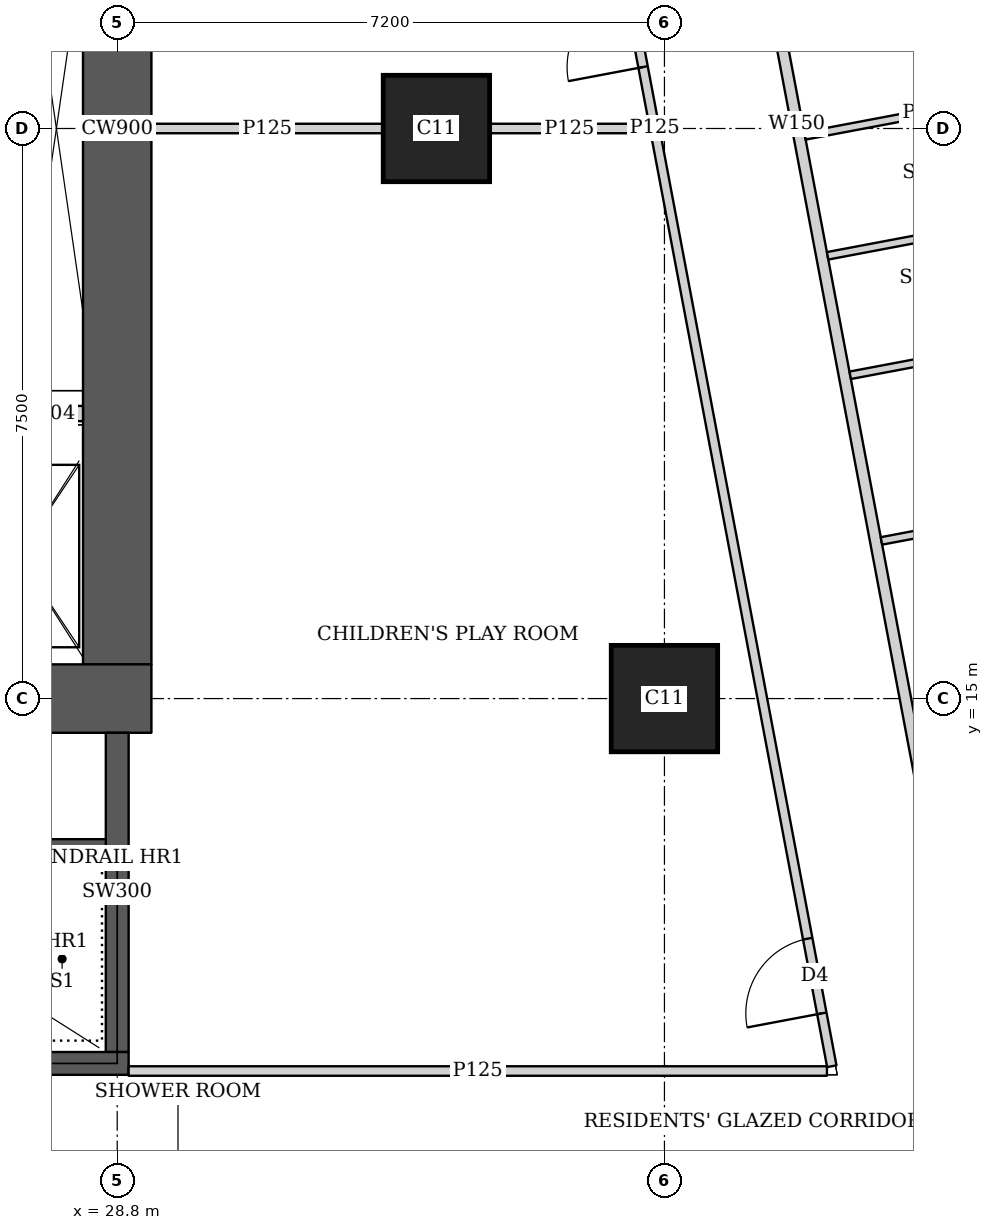
"""IFC4 building model, lengths in metres.
Left out: names, types, materials, properties, quantities, classifications, styles, units other than length and angle.
Written with IfcOpenShell. Run it as: python <this file> out.ifc"""

import sys

from ifc_helpers import new_model, si_unit, direction, frame, frame_2d, origin, origin_2d, place, context, subcontext, project, spatial, rectangle, extrude, element, fill, save


model = new_model("IFC4")
c1 = context("Model", 3, precision=1e-05, world=origin(), true_north=direction((0.0, 1.0)))
c2 = subcontext(c1, "Body", "Model", "MODEL_VIEW")
j1 = project(units=[si_unit("LENGTHUNIT", "METRE"), si_unit("PLANEANGLEUNIT", "RADIAN")], contexts=[c1])
p1 = place(None, origin())
s1 = spatial("IfcSite", under=j1, at=p1, CompositionType="ELEMENT")
p2 = place(p1, origin())
s2 = spatial("IfcBuilding", under=s1, at=p2, CompositionType="ELEMENT")
p3 = place(p2, frame((0.0, 0.0, 234.95)))
s3 = spatial("IfcBuildingStorey", under=s2, at=p3, CompositionType="ELEMENT", Elevation=234.95)
for number, where, z_axis, x_axis in (
    (1, (36.0, 15.0, 0.0), (0.0, 0.0, 1.0), (1.0, 0.0, 0.0)),
    (2, (33.0, 22.5, 0.0), (0.0, 0.0, 1.0), (1.0, 0.0, 0.0)),
):
    element("IfcColumn", number, at=place(p3, frame(where, z_axis=z_axis, x_axis=x_axis)), inside=s3, PredefinedType="COLUMN", context=c2, shape_type="SweptSolid", body=[
        extrude(rectangle(XDim=1.4, YDim=1.4, at=origin_2d()), origin(), (0.0, 0.0, 1.0), 3.75),
    ])
p4 = place(p3, frame((13.95, 15.0, 0.0), z_axis=(0.0, 0.0, 1.0), x_axis=(1.0, 0.0, 0.0)))
e3 = element("IfcWall", 3, at=p4, inside=s3, PredefinedType="SHEAR", context=c2, shape_type="SweptSolid", body=[
    extrude(rectangle(XDim=15.3, YDim=0.9, at=frame_2d((7.65, 0.0))), origin(), (0.0, 0.0, 1.0), 3.75),
])
p5 = place(p4, frame((4.45, 0.0, 0.0)))
e4 = element("IfcOpeningElement", 4, at=p5, cuts=e3, PredefinedType="OPENING", context=c2, shape_type="SweptSolid", body=[
    extrude(rectangle(XDim=1.8, YDim=2.1, at=frame_2d((0.9, 1.05))), frame((0.0, 0.46, 0.0), z_axis=(0.0, -1.0, 0.0), x_axis=(1.0, 0.0, 0.0)), (0.0, 0.0, 1.0), 0.92),
])
p6 = place(p4, frame((10.7, 0.0, 0.0)))
e5 = element("IfcOpeningElement", 5, at=p6, cuts=e3, PredefinedType="OPENING", context=c2, shape_type="SweptSolid", body=[
    extrude(rectangle(XDim=1.1, YDim=2.1, at=frame_2d((0.55, 1.05))), frame((0.0, 0.46, 0.0), z_axis=(0.0, -1.0, 0.0), x_axis=(1.0, 0.0, 0.0)), (0.0, 0.0, 1.0), 0.92),
])
p7 = place(p3, frame((28.8, 15.45, 0.0), z_axis=(0.0, 0.0, 1.0), x_axis=(0.0, 1.0, 0.0)))
e6 = element("IfcWall", 6, at=p7, inside=s3, PredefinedType="SHEAR", context=c2, shape_type="SweptSolid", body=[
    extrude(rectangle(XDim=14.1, YDim=0.9, at=frame_2d((7.05, 0.0))), origin(), (0.0, 0.0, 1.0), 3.75),
])
p8 = place(p3, frame((21.45, 10.2, 0.0), z_axis=(0.0, 0.0, 1.0), x_axis=(1.0, 0.0, 0.0)))
e7 = element("IfcWall", 7, at=p8, inside=s3, PredefinedType="SHEAR", context=c2, shape_type="SweptSolid", body=[
    extrude(rectangle(XDim=7.5, YDim=0.3, at=frame_2d((3.75, 0.0))), origin(), (0.0, 0.0, 1.0), 3.75),
])
p9 = place(p8, frame((0.5, 0.0, 0.0)))
e8 = element("IfcOpeningElement", 8, at=p9, cuts=e7, PredefinedType="OPENING", context=c2, shape_type="SweptSolid", body=[
    extrude(rectangle(XDim=1.1, YDim=2.1, at=frame_2d((0.55, 1.05))), frame((0.0, 0.16, 0.0), z_axis=(0.0, -1.0, 0.0), x_axis=(1.0, 0.0, 0.0)), (0.0, 0.0, 1.0), 0.32),
])
p10 = place(p3, frame((28.8, 10.35, 0.0), z_axis=(0.0, 0.0, 1.0), x_axis=(0.0, 1.0, 0.0)))
e9 = element("IfcWall", 9, at=p10, inside=s3, PredefinedType="SHEAR", context=c2, shape_type="SweptSolid", body=[
    extrude(rectangle(XDim=4.2, YDim=0.3, at=frame_2d((2.1, 0.0))), origin(), (0.0, 0.0, 1.0), 3.75),
])
p11 = place(p3, frame((33.933, 42.73, 0.0), z_axis=(0.0, 0.0, 1.0), x_axis=(0.185595417643, -0.982626246825, 0.0)))
e10 = element("IfcWall", 10, at=p11, inside=s3, PredefinedType="SOLIDWALL", context=c2, shape_type="SweptSolid", body=[
    extrude(rectangle(XDim=41.051, YDim=0.15, at=frame_2d((20.525, 0.0))), origin(), (0.0, 0.0, 1.0), 2.5),
])
p12 = place(p11, frame((12.266, 0.0, 0.0)))
e11 = element("IfcOpeningElement", 11, at=p12, cuts=e10, PredefinedType="OPENING", context=c2, shape_type="SweptSolid", body=[
    extrude(rectangle(XDim=1.0, YDim=2.1, at=frame_2d((0.5, 1.05))), frame((0.0, 0.085, 0.0), z_axis=(0.0, -1.0, 0.0), x_axis=(1.0, 0.0, 0.0)), (0.0, 0.0, 1.0), 0.17),
])
p13 = place(p11, frame((16.082, 0.0, 0.0)))
e12 = element("IfcOpeningElement", 12, at=p13, cuts=e10, PredefinedType="OPENING", context=c2, shape_type="SweptSolid", body=[
    extrude(rectangle(XDim=1.0, YDim=2.1, at=frame_2d((0.5, 1.05))), frame((0.0, 0.085, 0.0), z_axis=(0.0, -1.0, 0.0), x_axis=(1.0, 0.0, 0.0)), (0.0, 0.0, 1.0), 0.17),
])
p14 = place(p11, frame((30.862, 0.0, 0.0)))
e13 = element("IfcOpeningElement", 13, at=p14, cuts=e10, PredefinedType="OPENING", context=c2, shape_type="SweptSolid", body=[
    extrude(rectangle(XDim=1.0, YDim=2.1, at=frame_2d((0.5, 1.05))), frame((0.0, 0.085, 0.0), z_axis=(0.0, -1.0, 0.0), x_axis=(1.0, 0.0, 0.0)), (0.0, 0.0, 1.0), 0.17),
])
p15 = place(p3, frame((41.365, 21.433, 0.0), z_axis=(0.0, 0.0, 1.0), x_axis=(-0.982607026909, -0.185697147715, 0.0)))
e14 = element("IfcWall", 14, at=p15, inside=s3, PredefinedType="PARTITIONING", context=c2, shape_type="SweptSolid", body=[
    extrude(rectangle(XDim=3.275, YDim=0.1, at=frame_2d((1.637, 0.0))), origin(), (0.0, 0.0, 1.0), 3.5),
])
p16 = place(p3, frame((42.073, 17.682, 0.0), z_axis=(0.0, 0.0, 1.0), x_axis=(-0.982620626894, -0.185625169636, 0.0)))
e15 = element("IfcWall", 15, at=p16, inside=s3, PredefinedType="PARTITIONING", context=c2, shape_type="SweptSolid", body=[
    extrude(rectangle(XDim=3.275, YDim=0.1, at=frame_2d((1.637, 0.0))), origin(), (0.0, 0.0, 1.0), 3.5),
])
p17 = place(p16, frame((1.2, 0.0, 0.0)))
e16 = element("IfcOpeningElement", 16, at=p17, cuts=e15, PredefinedType="OPENING", context=c2, shape_type="SweptSolid", body=[
    extrude(rectangle(XDim=0.9, YDim=2.1, at=frame_2d((0.45, 1.05))), frame((0.0, 0.06, 0.0), z_axis=(0.0, -1.0, 0.0), x_axis=(1.0, 0.0, 0.0)), (0.0, 0.0, 1.0), 0.12),
])
p18 = place(p3, frame((41.067, 23.011, 0.0), z_axis=(0.0, 0.0, 1.0), x_axis=(-0.982618057925, -0.185638768151, 0.0)))
e17 = element("IfcWall", 17, at=p18, inside=s3, PredefinedType="PARTITIONING", context=c2, shape_type="SweptSolid", body=[
    extrude(rectangle(XDim=3.275, YDim=0.1, at=frame_2d((1.637, 0.0))), origin(), (0.0, 0.0, 1.0), 2.5),
])
p19 = place(p3, frame((41.662, 19.861, 0.0), z_axis=(0.0, 0.0, 1.0), x_axis=(-0.982607026909, -0.185697147715, 0.0)))
e18 = element("IfcWall", 18, at=p19, inside=s3, PredefinedType="PARTITIONING", context=c2, shape_type="SweptSolid", body=[
    extrude(rectangle(XDim=3.275, YDim=0.1, at=frame_2d((1.637, 0.0))), origin(), (0.0, 0.0, 1.0), 3.5),
])
p20 = place(p3, frame((28.95, 10.1, 0.0), z_axis=(0.0, 0.0, 1.0), x_axis=(1.0, 0.0, 0.0)))
e19 = element("IfcWall", 19, at=p20, inside=s3, PredefinedType="PARTITIONING", context=c2, shape_type="SweptSolid", body=[
    extrude(rectangle(XDim=9.188, YDim=0.125, at=frame_2d((4.594, 0.0))), origin(), (0.0, 0.0, 1.0), 3.5),
])
p21 = place(p3, frame((38.202, 10.163, 0.0), z_axis=(0.0, 0.0, 1.0), x_axis=(-0.185610321132, 0.982623431783, 0.0)))
e20 = element("IfcWall", 20, at=p21, inside=s3, PredefinedType="PARTITIONING", context=c2, shape_type="SweptSolid", body=[
    extrude(rectangle(XDim=25.111, YDim=0.125, at=frame_2d((12.556, 0.0))), origin(), (0.0, 0.0, 1.0), 2.5),
])
p22 = place(p21, frame((0.708, 0.0, 0.0)))
e21 = element("IfcOpeningElement", 21, at=p22, cuts=e20, PredefinedType="OPENING", context=c2, shape_type="SweptSolid", body=[
    extrude(rectangle(XDim=1.0, YDim=2.1, at=frame_2d((0.5, 1.05))), frame((0.0, 0.073, 0.0), z_axis=(0.0, -1.0, 0.0), x_axis=(1.0, 0.0, 0.0)), (0.0, 0.0, 1.0), 0.145),
])
p23 = place(p21, frame((13.378, 0.0, 0.0)))
e22 = element("IfcOpeningElement", 22, at=p23, cuts=e20, PredefinedType="OPENING", context=c2, shape_type="SweptSolid", body=[
    extrude(rectangle(XDim=1.0, YDim=2.1, at=frame_2d((0.5, 1.05))), frame((0.0, 0.073, 0.0), z_axis=(0.0, -1.0, 0.0), x_axis=(1.0, 0.0, 0.0)), (0.0, 0.0, 1.0), 0.145),
])
p24 = place(p21, frame((21.15, 0.0, 0.0)))
e23 = element("IfcOpeningElement", 23, at=p24, cuts=e20, PredefinedType="OPENING", context=c2, shape_type="SweptSolid", body=[
    extrude(rectangle(XDim=1.0, YDim=2.1, at=frame_2d((0.5, 1.05))), frame((0.0, 0.073, 0.0), z_axis=(0.0, -1.0, 0.0), x_axis=(1.0, 0.0, 0.0)), (0.0, 0.0, 1.0), 0.145),
])
p25 = place(p21, frame((23.453, 0.0, 0.0)))
e24 = element("IfcOpeningElement", 24, at=p25, cuts=e20, PredefinedType="OPENING", context=c2, shape_type="SweptSolid", body=[
    extrude(rectangle(XDim=1.0, YDim=2.1, at=frame_2d((0.5, 1.05))), frame((0.0, 0.073, 0.0), z_axis=(0.0, -1.0, 0.0), x_axis=(1.0, 0.0, 0.0)), (0.0, 0.0, 1.0), 0.145),
])
p26 = place(p3, frame((29.25, 22.5, 0.0), z_axis=(0.0, 0.0, 1.0), x_axis=(1.0, 0.0, 0.0)))
e25 = element("IfcWall", 25, at=p26, inside=s3, PredefinedType="PARTITIONING", context=c2, shape_type="SweptSolid", body=[
    extrude(rectangle(XDim=3.049, YDim=0.125, at=frame_2d((1.524, 0.0))), origin(), (0.0, 0.0, 1.0), 3.5),
])
p27 = place(p3, frame((33.701, 22.5, 0.0), z_axis=(0.0, 0.0, 1.0), x_axis=(1.0, 0.0, 0.0)))
e26 = element("IfcWall", 26, at=p27, inside=s3, PredefinedType="PARTITIONING", context=c2, shape_type="SweptSolid", body=[
    extrude(rectangle(XDim=2.095, YDim=0.125, at=frame_2d((1.047, 0.0))), origin(), (0.0, 0.0, 1.0), 2.5),
])
p28 = place(p3, frame((23.0, 13.05, 0.0), z_axis=(0.0, 0.0, 1.0), x_axis=(1.0, 0.0, 0.0)))
e27 = element("IfcWall", 27, at=p28, inside=s3, PredefinedType="SHEAR", context=c2, shape_type="SweptSolid", body=[
    extrude(rectangle(XDim=5.8, YDim=0.2, at=frame_2d((2.9, 0.0))), origin(), (0.0, 0.0, 1.0), 3.75),
])
p29 = place(p3, frame((27.4, 18.75, 0.0), z_axis=(0.0, 0.0, 1.0), x_axis=(1.0, 0.0, 0.0)))
e28 = element("IfcWall", 28, at=p29, inside=s3, PredefinedType="SOLIDWALL", context=c2, shape_type="SweptSolid", body=[
    extrude(rectangle(XDim=0.95, YDim=0.2, at=frame_2d((0.475, 0.0))), origin(), (0.0, 0.0, 1.0), 3.5),
])
p30 = place(p22, origin())
e29 = element("IfcDoor", 29, at=p30, inside=s3, OperationType="SINGLE_SWING_LEFT", PredefinedType="DOOR", context=c2, shape_type="SweptSolid", body=[
    extrude(rectangle(XDim=1.0, YDim=2.1, at=frame_2d((0.5, 1.05))), frame((0.0, 0.025, 0.0), z_axis=(0.0, -1.0, 0.0), x_axis=(1.0, 0.0, 0.0)), (0.0, 0.0, 1.0), 0.05),
])
fill(e21, e29)
p31 = place(p23, origin())
e30 = element("IfcDoor", 30, at=p31, inside=s3, OperationType="SINGLE_SWING_LEFT", PredefinedType="DOOR", context=c2, shape_type="SweptSolid", body=[
    extrude(rectangle(XDim=1.0, YDim=2.1, at=frame_2d((0.5, 1.05))), frame((0.0, 0.025, 0.0), z_axis=(0.0, -1.0, 0.0), x_axis=(1.0, 0.0, 0.0)), (0.0, 0.0, 1.0), 0.05),
])
fill(e22, e30)
save(model, sys.argv[1])
